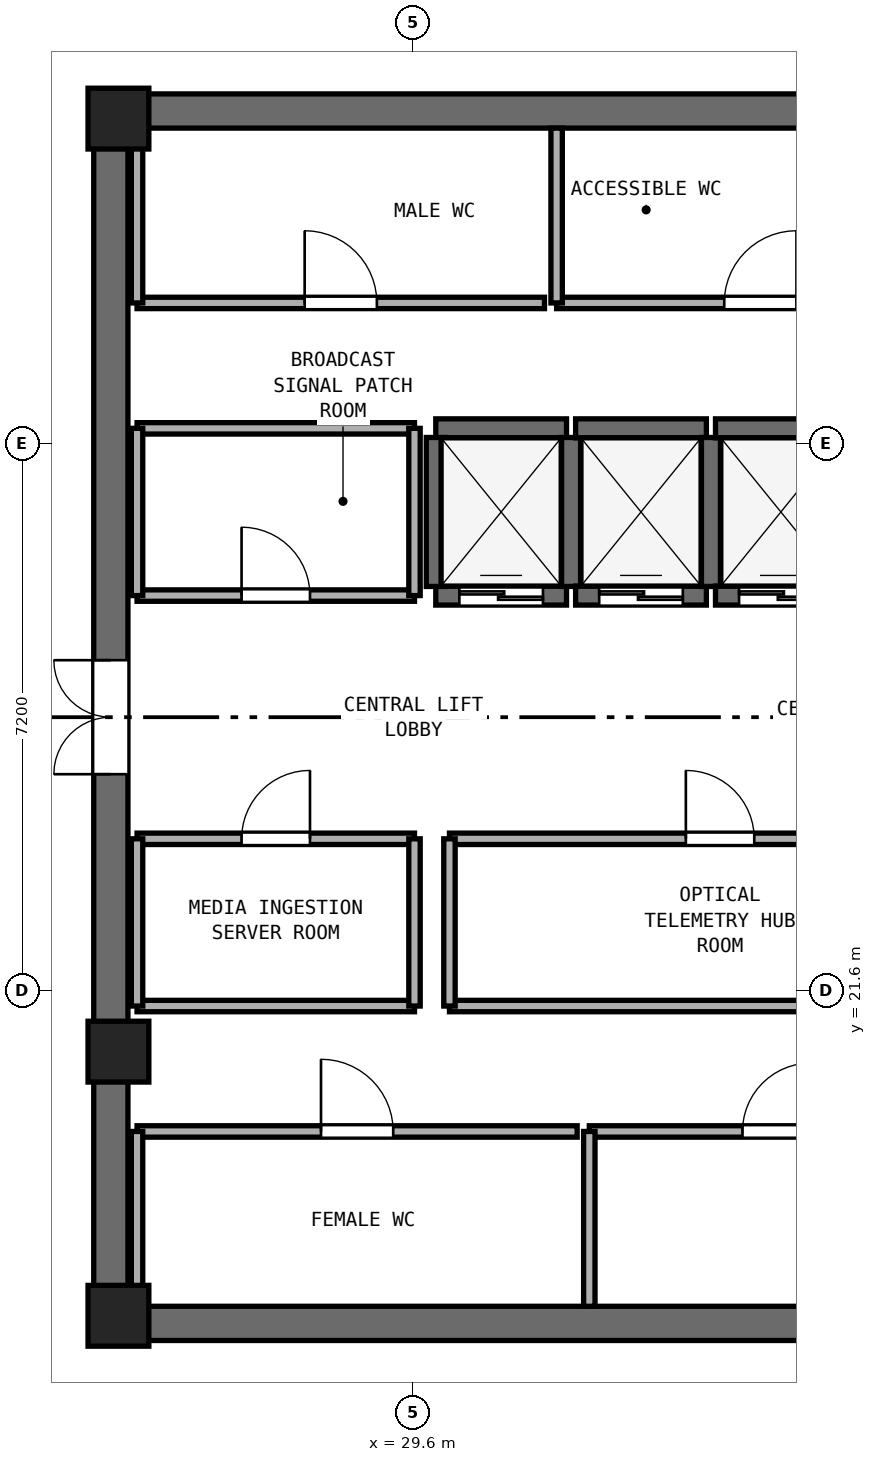
"""IFC4 building model, lengths in metres.
Left out: names, types, materials, properties, quantities, classifications, styles, units other than length and angle.
Written with IfcOpenShell. Run it as: python <this file> out.ifc"""

import sys

from ifc_helpers import new_model, si_unit, direction, frame, frame_2d, origin, origin_2d, place, context, subcontext, project, spatial, rectangle, extrude, element, fill, save


model = new_model("IFC4")
c1 = context("Model", 3, precision=1e-05, world=origin(), true_north=direction((0.0, 1.0)))
c2 = subcontext(c1, "Body", "Model", "MODEL_VIEW")
j1 = project(units=[si_unit("LENGTHUNIT", "METRE"), si_unit("PLANEANGLEUNIT", "RADIAN")], contexts=[c1])
p1 = place(None, origin())
s1 = spatial("IfcSite", under=j1, at=p1, CompositionType="ELEMENT")
p2 = place(p1, origin())
s2 = spatial("IfcBuilding", under=s1, at=p2, CompositionType="ELEMENT")
p3 = place(p2, frame((0.0, 0.0, 259.2)))
s3 = spatial("IfcBuildingStorey", under=s2, at=p3, CompositionType="ELEMENT", Elevation=259.2)
for number, where, z_axis, x_axis in (
    (1, (25.4, 17.225, 0.0), (0.0, 0.0, 1.0), (1.0, 0.0, 0.0)),
    (2, (25.4, 33.175, 0.0), (0.0, 0.0, 1.0), (1.0, 0.0, 0.0)),
):
    element("IfcWall", number, at=place(p3, frame(where, z_axis=z_axis, x_axis=x_axis)), inside=s3, PredefinedType="SHEAR", context=c2, shape_type="SweptSolid", body=[
        extrude(rectangle(XDim=23.2, YDim=0.45, at=frame_2d((11.6, 0.0))), origin(), (0.0, 0.0, 1.0), 3.51),
    ])
p4 = place(p3, frame((25.625, 17.45, 0.0), z_axis=(0.0, 0.0, 1.0), x_axis=(0.0, 1.0, 0.0)))
e3 = element("IfcWall", 3, at=p4, inside=s3, PredefinedType="SHEAR", context=c2, shape_type="SweptSolid", body=[
    extrude(rectangle(XDim=15.5, YDim=0.45, at=frame_2d((7.75, 0.0))), origin(), (0.0, 0.0, 1.0), 3.51),
])
p5 = place(p4, frame((7.0, 0.0, 0.0)))
e4 = element("IfcOpeningElement", 4, at=p5, cuts=e3, PredefinedType="OPENING", context=c2, shape_type="SweptSolid", body=[
    extrude(rectangle(XDim=1.5, YDim=2.15, at=frame_2d((0.75, 1.075))), frame((0.0, 0.235, 0.0), z_axis=(0.0, -1.0, 0.0), x_axis=(1.0, 0.0, 0.0)), (0.0, 0.0, 1.0), 0.47),
])
for number, where, z_axis, x_axis in (
    (5, (25.725, 17.325, 0.0), (0.0, 0.0, 1.0), (1.0, 0.0, 0.0)),
    (6, (25.725, 33.075, 0.0), (0.0, 0.0, 1.0), (1.0, 0.0, 0.0)),
    (7, (25.725, 20.8, 0.0), (0.0, 0.0, 1.0), (1.0, 0.0, 0.0)),
):
    element("IfcColumn", number, at=place(p3, frame(where, z_axis=z_axis, x_axis=x_axis)), inside=s3, PredefinedType="PILASTER", context=c2, shape_type="SweptSolid", body=[
        extrude(rectangle(XDim=0.8, YDim=0.8, at=origin_2d()), origin(), (0.0, 0.0, 1.0), 3.8),
    ])
p6 = place(p3, frame((29.9, 26.8, 0.0), z_axis=(0.0, 0.0, 1.0), x_axis=(1.0, 0.0, 0.0)))
e8 = element("IfcWall", 8, at=p6, inside=s3, PredefinedType="SHEAR", context=c2, shape_type="SweptSolid", body=[
    extrude(rectangle(XDim=1.72, YDim=0.25, at=frame_2d((0.86, 0.0))), origin(), (0.0, 0.0, 1.0), 3.51),
])
p7 = place(p6, frame((0.31, 0.0, 0.0)))
e9 = element("IfcOpeningElement", 9, at=p7, cuts=e8, PredefinedType="OPENING", context=c2, shape_type="SweptSolid", body=[
    extrude(rectangle(XDim=1.1, YDim=2.15, at=frame_2d((0.55, 1.075))), frame((0.0, 0.135, 0.0), z_axis=(0.0, -1.0, 0.0), x_axis=(1.0, 0.0, 0.0)), (0.0, 0.0, 1.0), 0.27),
])
p8 = place(p3, frame((29.9, 29.0, 0.0), z_axis=(0.0, 0.0, 1.0), x_axis=(1.0, 0.0, 0.0)))
e10 = element("IfcWall", 10, at=p8, inside=s3, PredefinedType="SHEAR", context=c2, shape_type="SweptSolid", body=[
    extrude(rectangle(XDim=1.72, YDim=0.25, at=frame_2d((0.86, 0.0))), origin(), (0.0, 0.0, 1.0), 3.51),
])
for number, where, z_axis, x_axis in (
    (11, (29.9, 26.92, 0.0), (0.0, 0.0, 1.0), (0.0, 1.0, 0.0)),
    (12, (31.68, 26.92, 0.0), (0.0, 0.0, 1.0), (0.0, 1.0, 0.0)),
):
    element("IfcWall", number, at=place(p3, frame(where, z_axis=z_axis, x_axis=x_axis)), inside=s3, PredefinedType="SHEAR", context=c2, shape_type="SweptSolid", body=[
        extrude(rectangle(XDim=1.96, YDim=0.25, at=frame_2d((0.98, 0.0))), origin(), (0.0, 0.0, 1.0), 3.51),
    ])
p9 = place(p3, frame((31.74, 26.8, 0.0), z_axis=(0.0, 0.0, 1.0), x_axis=(1.0, 0.0, 0.0)))
e13 = element("IfcWall", 13, at=p9, inside=s3, PredefinedType="SHEAR", context=c2, shape_type="SweptSolid", body=[
    extrude(rectangle(XDim=1.72, YDim=0.25, at=frame_2d((0.86, 0.0))), origin(), (0.0, 0.0, 1.0), 3.51),
])
p10 = place(p9, frame((0.31, 0.0, 0.0)))
e14 = element("IfcOpeningElement", 14, at=p10, cuts=e13, PredefinedType="OPENING", context=c2, shape_type="SweptSolid", body=[
    extrude(rectangle(XDim=1.1, YDim=2.15, at=frame_2d((0.55, 1.075))), frame((0.0, 0.135, 0.0), z_axis=(0.0, -1.0, 0.0), x_axis=(1.0, 0.0, 0.0)), (0.0, 0.0, 1.0), 0.27),
])
p11 = place(p3, frame((31.74, 29.0, 0.0), z_axis=(0.0, 0.0, 1.0), x_axis=(1.0, 0.0, 0.0)))
e15 = element("IfcWall", 15, at=p11, inside=s3, PredefinedType="SHEAR", context=c2, shape_type="SweptSolid", body=[
    extrude(rectangle(XDim=1.72, YDim=0.25, at=frame_2d((0.86, 0.0))), origin(), (0.0, 0.0, 1.0), 3.51),
])
p12 = place(p3, frame((33.52, 26.92, 0.0), z_axis=(0.0, 0.0, 1.0), x_axis=(0.0, 1.0, 0.0)))
e16 = element("IfcWall", 16, at=p12, inside=s3, PredefinedType="SHEAR", context=c2, shape_type="SweptSolid", body=[
    extrude(rectangle(XDim=1.96, YDim=0.25, at=frame_2d((0.98, 0.0))), origin(), (0.0, 0.0, 1.0), 3.51),
])
p13 = place(p3, frame((33.58, 26.8, 0.0), z_axis=(0.0, 0.0, 1.0), x_axis=(1.0, 0.0, 0.0)))
e17 = element("IfcWall", 17, at=p13, inside=s3, PredefinedType="SHEAR", context=c2, shape_type="SweptSolid", body=[
    extrude(rectangle(XDim=1.72, YDim=0.25, at=frame_2d((0.86, 0.0))), origin(), (0.0, 0.0, 1.0), 3.51),
])
p14 = place(p13, frame((0.31, 0.0, 0.0)))
e18 = element("IfcOpeningElement", 18, at=p14, cuts=e17, PredefinedType="OPENING", context=c2, shape_type="SweptSolid", body=[
    extrude(rectangle(XDim=1.1, YDim=2.15, at=frame_2d((0.55, 1.075))), frame((0.0, 0.135, 0.0), z_axis=(0.0, -1.0, 0.0), x_axis=(1.0, 0.0, 0.0)), (0.0, 0.0, 1.0), 0.27),
])
p15 = place(p3, frame((33.58, 29.0, 0.0), z_axis=(0.0, 0.0, 1.0), x_axis=(1.0, 0.0, 0.0)))
e19 = element("IfcWall", 19, at=p15, inside=s3, PredefinedType="SHEAR", context=c2, shape_type="SweptSolid", body=[
    extrude(rectangle(XDim=1.72, YDim=0.25, at=frame_2d((0.86, 0.0))), origin(), (0.0, 0.0, 1.0), 3.51),
])
p16 = place(p3, frame((25.97, 30.65, 0.0), z_axis=(0.0, 0.0, 1.0), x_axis=(1.0, 0.0, 0.0)))
e20 = element("IfcWall", 20, at=p16, inside=s3, PredefinedType="PARTITIONING", context=c2, shape_type="SweptSolid", body=[
    extrude(rectangle(XDim=5.36, YDim=0.15, at=frame_2d((2.68, 0.0))), origin(), (0.0, 0.0, 1.0), 3.51),
])
p17 = place(p16, frame((2.205, 0.0, 0.0)))
e21 = element("IfcOpeningElement", 21, at=p17, cuts=e20, PredefinedType="OPENING", context=c2, shape_type="SweptSolid", body=[
    extrude(rectangle(XDim=0.95, YDim=2.1, at=frame_2d((0.475, 1.05))), frame((0.0, 0.085, 0.0), z_axis=(0.0, -1.0, 0.0), x_axis=(1.0, 0.0, 0.0)), (0.0, 0.0, 1.0), 0.17),
])
p18 = place(p3, frame((25.97, 30.65, 0.0), z_axis=(0.0, 0.0, 1.0), x_axis=(0.0, 1.0, 0.0)))
e22 = element("IfcWall", 22, at=p18, inside=s3, PredefinedType="PARTITIONING", context=c2, shape_type="SweptSolid", body=[
    extrude(rectangle(XDim=2.3, YDim=0.15, at=frame_2d((1.15, 0.0))), origin(), (0.0, 0.0, 1.0), 2.61),
])
p19 = place(p3, frame((31.49, 30.65, 0.0), z_axis=(0.0, 0.0, 1.0), x_axis=(1.0, 0.0, 0.0)))
e23 = element("IfcWall", 23, at=p19, inside=s3, PredefinedType="PARTITIONING", context=c2, shape_type="SweptSolid", body=[
    extrude(rectangle(XDim=5.36, YDim=0.15, at=frame_2d((2.68, 0.0))), origin(), (0.0, 0.0, 1.0), 3.51),
])
p20 = place(p19, frame((2.205, 0.0, 0.0)))
e24 = element("IfcOpeningElement", 24, at=p20, cuts=e23, PredefinedType="OPENING", context=c2, shape_type="SweptSolid", body=[
    extrude(rectangle(XDim=0.95, YDim=2.1, at=frame_2d((0.475, 1.05))), frame((0.0, 0.085, 0.0), z_axis=(0.0, -1.0, 0.0), x_axis=(1.0, 0.0, 0.0)), (0.0, 0.0, 1.0), 0.17),
])
p21 = place(p3, frame((31.49, 30.65, 0.0), z_axis=(0.0, 0.0, 1.0), x_axis=(0.0, 1.0, 0.0)))
e25 = element("IfcWall", 25, at=p21, inside=s3, PredefinedType="PARTITIONING", context=c2, shape_type="SweptSolid", body=[
    extrude(rectangle(XDim=2.3, YDim=0.15, at=frame_2d((1.15, 0.0))), origin(), (0.0, 0.0, 1.0), 3.51),
])
p22 = place(p3, frame((25.97, 19.75, 0.0), z_axis=(0.0, 0.0, 1.0), x_axis=(1.0, 0.0, 0.0)))
e26 = element("IfcWall", 26, at=p22, inside=s3, PredefinedType="PARTITIONING", context=c2, shape_type="SweptSolid", body=[
    extrude(rectangle(XDim=5.79, YDim=0.15, at=frame_2d((2.895, 0.0))), origin(), (0.0, 0.0, 1.0), 3.51),
])
p23 = place(p22, frame((2.42, 0.0, 0.0)))
e27 = element("IfcOpeningElement", 27, at=p23, cuts=e26, PredefinedType="OPENING", context=c2, shape_type="SweptSolid", body=[
    extrude(rectangle(XDim=0.95, YDim=2.1, at=frame_2d((0.475, 1.05))), frame((0.0, 0.085, 0.0), z_axis=(0.0, -1.0, 0.0), x_axis=(1.0, 0.0, 0.0)), (0.0, 0.0, 1.0), 0.17),
])
p24 = place(p3, frame((25.97, 17.45, 0.0), z_axis=(0.0, 0.0, 1.0), x_axis=(0.0, 1.0, 0.0)))
e28 = element("IfcWall", 28, at=p24, inside=s3, PredefinedType="PARTITIONING", context=c2, shape_type="SweptSolid", body=[
    extrude(rectangle(XDim=2.3, YDim=0.15, at=frame_2d((1.15, 0.0))), origin(), (0.0, 0.0, 1.0), 2.61),
])
p25 = place(p3, frame((31.92, 19.75, 0.0), z_axis=(0.0, 0.0, 1.0), x_axis=(1.0, 0.0, 0.0)))
e29 = element("IfcWall", 29, at=p25, inside=s3, PredefinedType="PARTITIONING", context=c2, shape_type="SweptSolid", body=[
    extrude(rectangle(XDim=4.93, YDim=0.15, at=frame_2d((2.465, 0.0))), origin(), (0.0, 0.0, 1.0), 3.51),
])
p26 = place(p25, frame((2.015, 0.0, 0.0)))
e30 = element("IfcOpeningElement", 30, at=p26, cuts=e29, PredefinedType="OPENING", context=c2, shape_type="SweptSolid", body=[
    extrude(rectangle(XDim=0.9, YDim=2.1, at=frame_2d((0.45, 1.05))), frame((0.0, 0.085, 0.0), z_axis=(0.0, -1.0, 0.0), x_axis=(1.0, 0.0, 0.0)), (0.0, 0.0, 1.0), 0.17),
])
p27 = place(p3, frame((31.92, 17.45, 0.0), z_axis=(0.0, 0.0, 1.0), x_axis=(0.0, 1.0, 0.0)))
e31 = element("IfcWall", 31, at=p27, inside=s3, PredefinedType="PARTITIONING", context=c2, shape_type="SweptSolid", body=[
    extrude(rectangle(XDim=2.3, YDim=0.15, at=frame_2d((1.15, 0.0))), origin(), (0.0, 0.0, 1.0), 3.51),
])
p28 = place(p3, frame((25.97, 26.8, 0.0), z_axis=(0.0, 0.0, 1.0), x_axis=(1.0, 0.0, 0.0)))
e32 = element("IfcWall", 32, at=p28, inside=s3, PredefinedType="PARTITIONING", context=c2, shape_type="SweptSolid", body=[
    extrude(rectangle(XDim=3.65, YDim=0.15, at=frame_2d((1.825, 0.0))), origin(), (0.0, 0.0, 1.0), 3.51),
])
p29 = place(p28, frame((1.375, 0.0, 0.0)))
e33 = element("IfcOpeningElement", 33, at=p29, cuts=e32, PredefinedType="OPENING", context=c2, shape_type="SweptSolid", body=[
    extrude(rectangle(XDim=0.9, YDim=2.1, at=frame_2d((0.45, 1.05))), frame((0.0, 0.085, 0.0), z_axis=(0.0, -1.0, 0.0), x_axis=(1.0, 0.0, 0.0)), (0.0, 0.0, 1.0), 0.17),
])
p30 = place(p3, frame((25.97, 29.0, 0.0), z_axis=(0.0, 0.0, 1.0), x_axis=(1.0, 0.0, 0.0)))
e34 = element("IfcWall", 34, at=p30, inside=s3, PredefinedType="PARTITIONING", context=c2, shape_type="SweptSolid", body=[
    extrude(rectangle(XDim=3.65, YDim=0.15, at=frame_2d((1.825, 0.0))), origin(), (0.0, 0.0, 1.0), 3.51),
])
p31 = place(p3, frame((25.97, 26.8, 0.0), z_axis=(0.0, 0.0, 1.0), x_axis=(0.0, 1.0, 0.0)))
e35 = element("IfcWall", 35, at=p31, inside=s3, PredefinedType="PARTITIONING", context=c2, shape_type="SweptSolid", body=[
    extrude(rectangle(XDim=2.2, YDim=0.15, at=frame_2d((1.1, 0.0))), origin(), (0.0, 0.0, 1.0), 2.61),
])
p32 = place(p3, frame((29.62, 26.8, 0.0), z_axis=(0.0, 0.0, 1.0), x_axis=(0.0, 1.0, 0.0)))
e36 = element("IfcWall", 36, at=p32, inside=s3, PredefinedType="PARTITIONING", context=c2, shape_type="SweptSolid", body=[
    extrude(rectangle(XDim=2.2, YDim=0.15, at=frame_2d((1.1, 0.0))), origin(), (0.0, 0.0, 1.0), 3.51),
])
p33 = place(p3, frame((25.97, 21.4, 0.0), z_axis=(0.0, 0.0, 1.0), x_axis=(1.0, 0.0, 0.0)))
e37 = element("IfcWall", 37, at=p33, inside=s3, PredefinedType="PARTITIONING", context=c2, shape_type="SweptSolid", body=[
    extrude(rectangle(XDim=3.65, YDim=0.15, at=frame_2d((1.825, 0.0))), origin(), (0.0, 0.0, 1.0), 3.51),
])
p34 = place(p3, frame((25.97, 23.6, 0.0), z_axis=(0.0, 0.0, 1.0), x_axis=(1.0, 0.0, 0.0)))
e38 = element("IfcWall", 38, at=p34, inside=s3, PredefinedType="PARTITIONING", context=c2, shape_type="SweptSolid", body=[
    extrude(rectangle(XDim=3.65, YDim=0.15, at=frame_2d((1.825, 0.0))), origin(), (0.0, 0.0, 1.0), 3.51),
])
p35 = place(p34, frame((1.375, 0.0, 0.0)))
e39 = element("IfcOpeningElement", 39, at=p35, cuts=e38, PredefinedType="OPENING", context=c2, shape_type="SweptSolid", body=[
    extrude(rectangle(XDim=0.9, YDim=2.1, at=frame_2d((0.45, 1.05))), frame((0.0, 0.085, 0.0), z_axis=(0.0, -1.0, 0.0), x_axis=(1.0, 0.0, 0.0)), (0.0, 0.0, 1.0), 0.17),
])
p36 = place(p3, frame((25.97, 21.4, 0.0), z_axis=(0.0, 0.0, 1.0), x_axis=(0.0, 1.0, 0.0)))
e40 = element("IfcWall", 40, at=p36, inside=s3, PredefinedType="PARTITIONING", context=c2, shape_type="SweptSolid", body=[
    extrude(rectangle(XDim=2.2, YDim=0.15, at=frame_2d((1.1, 0.0))), origin(), (0.0, 0.0, 1.0), 2.61),
])
p37 = place(p3, frame((29.62, 21.4, 0.0), z_axis=(0.0, 0.0, 1.0), x_axis=(0.0, 1.0, 0.0)))
e41 = element("IfcWall", 41, at=p37, inside=s3, PredefinedType="PARTITIONING", context=c2, shape_type="SweptSolid", body=[
    extrude(rectangle(XDim=2.2, YDim=0.15, at=frame_2d((1.1, 0.0))), origin(), (0.0, 0.0, 1.0), 3.51),
])
p38 = place(p3, frame((30.08, 21.4, 0.0), z_axis=(0.0, 0.0, 1.0), x_axis=(1.0, 0.0, 0.0)))
e42 = element("IfcWall", 42, at=p38, inside=s3, PredefinedType="PARTITIONING", context=c2, shape_type="SweptSolid", body=[
    extrude(rectangle(XDim=7.12, YDim=0.15, at=frame_2d((3.56, 0.0))), origin(), (0.0, 0.0, 1.0), 3.51),
])
p39 = place(p3, frame((30.08, 23.6, 0.0), z_axis=(0.0, 0.0, 1.0), x_axis=(1.0, 0.0, 0.0)))
e43 = element("IfcWall", 43, at=p39, inside=s3, PredefinedType="PARTITIONING", context=c2, shape_type="SweptSolid", body=[
    extrude(rectangle(XDim=7.12, YDim=0.15, at=frame_2d((3.56, 0.0))), origin(), (0.0, 0.0, 1.0), 3.51),
])
p40 = place(p39, frame((3.11, 0.0, 0.0)))
e44 = element("IfcOpeningElement", 44, at=p40, cuts=e43, PredefinedType="OPENING", context=c2, shape_type="SweptSolid", body=[
    extrude(rectangle(XDim=0.9, YDim=2.1, at=frame_2d((0.45, 1.05))), frame((0.0, 0.085, 0.0), z_axis=(0.0, -1.0, 0.0), x_axis=(1.0, 0.0, 0.0)), (0.0, 0.0, 1.0), 0.17),
])
p41 = place(p3, frame((30.08, 21.4, 0.0), z_axis=(0.0, 0.0, 1.0), x_axis=(0.0, 1.0, 0.0)))
e45 = element("IfcWall", 45, at=p41, inside=s3, PredefinedType="PARTITIONING", context=c2, shape_type="SweptSolid", body=[
    extrude(rectangle(XDim=2.2, YDim=0.15, at=frame_2d((1.1, 0.0))), origin(), (0.0, 0.0, 1.0), 3.51),
])
p42 = place(p7, origin())
e46 = element("IfcDoor", 46, at=p42, inside=s3, OperationType="DOUBLE_DOOR_SLIDING", PredefinedType="DOOR", context=c2, shape_type="SweptSolid", body=[
    extrude(rectangle(XDim=1.1, YDim=2.15, at=frame_2d((0.55, 1.075))), frame((0.0, 0.025, 0.0), z_axis=(0.0, -1.0, 0.0), x_axis=(1.0, 0.0, 0.0)), (0.0, 0.0, 1.0), 0.05),
])
fill(e9, e46)
p43 = place(p10, origin())
e47 = element("IfcDoor", 47, at=p43, inside=s3, OperationType="DOUBLE_DOOR_SLIDING", PredefinedType="DOOR", context=c2, shape_type="SweptSolid", body=[
    extrude(rectangle(XDim=1.1, YDim=2.15, at=frame_2d((0.55, 1.075))), frame((0.0, 0.025, 0.0), z_axis=(0.0, -1.0, 0.0), x_axis=(1.0, 0.0, 0.0)), (0.0, 0.0, 1.0), 0.05),
])
fill(e14, e47)
p44 = place(p14, origin())
e48 = element("IfcDoor", 48, at=p44, inside=s3, OperationType="DOUBLE_DOOR_SLIDING", PredefinedType="DOOR", context=c2, shape_type="SweptSolid", body=[
    extrude(rectangle(XDim=1.1, YDim=2.15, at=frame_2d((0.55, 1.075))), frame((0.0, 0.025, 0.0), z_axis=(0.0, -1.0, 0.0), x_axis=(1.0, 0.0, 0.0)), (0.0, 0.0, 1.0), 0.05),
])
fill(e18, e48)
p45 = place(p5, origin())
e49 = element("IfcDoor", 49, at=p45, inside=s3, OperationType="DOUBLE_DOOR_SINGLE_SWING", PredefinedType="DOOR", context=c2, shape_type="SweptSolid", body=[
    extrude(rectangle(XDim=1.5, YDim=2.15, at=frame_2d((0.75, 1.075))), frame((0.0, 0.025, 0.0), z_axis=(0.0, -1.0, 0.0), x_axis=(1.0, 0.0, 0.0)), (0.0, 0.0, 1.0), 0.05),
])
fill(e4, e49)
p46 = place(p17, origin())
e50 = element("IfcDoor", 50, at=p46, inside=s3, OperationType="SINGLE_SWING_LEFT", PredefinedType="DOOR", context=c2, shape_type="SweptSolid", body=[
    extrude(rectangle(XDim=0.95, YDim=2.1, at=frame_2d((0.475, 1.05))), frame((0.0, 0.025, 0.0), z_axis=(0.0, -1.0, 0.0), x_axis=(1.0, 0.0, 0.0)), (0.0, 0.0, 1.0), 0.05),
])
fill(e21, e50)
p47 = place(p20, origin())
e51 = element("IfcDoor", 51, at=p47, inside=s3, OperationType="SINGLE_SWING_RIGHT", PredefinedType="DOOR", context=c2, shape_type="SweptSolid", body=[
    extrude(rectangle(XDim=0.95, YDim=2.1, at=frame_2d((0.475, 1.05))), frame((0.0, 0.025, 0.0), z_axis=(0.0, -1.0, 0.0), x_axis=(1.0, 0.0, 0.0)), (0.0, 0.0, 1.0), 0.05),
])
fill(e24, e51)
p48 = place(p23, origin())
e52 = element("IfcDoor", 52, at=p48, inside=s3, OperationType="SINGLE_SWING_LEFT", PredefinedType="DOOR", context=c2, shape_type="SweptSolid", body=[
    extrude(rectangle(XDim=0.95, YDim=2.1, at=frame_2d((0.475, 1.05))), frame((0.0, 0.025, 0.0), z_axis=(0.0, -1.0, 0.0), x_axis=(1.0, 0.0, 0.0)), (0.0, 0.0, 1.0), 0.05),
])
fill(e27, e52)
p49 = place(p26, origin())
e53 = element("IfcDoor", 53, at=p49, inside=s3, OperationType="SINGLE_SWING_RIGHT", PredefinedType="DOOR", context=c2, shape_type="SweptSolid", body=[
    extrude(rectangle(XDim=0.9, YDim=2.1, at=frame_2d((0.45, 1.05))), frame((0.0, 0.025, 0.0), z_axis=(0.0, -1.0, 0.0), x_axis=(1.0, 0.0, 0.0)), (0.0, 0.0, 1.0), 0.05),
])
fill(e30, e53)
p50 = place(p29, origin())
e54 = element("IfcDoor", 54, at=p50, inside=s3, OperationType="SINGLE_SWING_LEFT", PredefinedType="DOOR", context=c2, shape_type="SweptSolid", body=[
    extrude(rectangle(XDim=0.9, YDim=2.1, at=frame_2d((0.45, 1.05))), frame((0.0, 0.025, 0.0), z_axis=(0.0, -1.0, 0.0), x_axis=(1.0, 0.0, 0.0)), (0.0, 0.0, 1.0), 0.05),
])
fill(e33, e54)
p51 = place(p35, origin())
e55 = element("IfcDoor", 55, at=p51, inside=s3, OperationType="SINGLE_SWING_RIGHT", PredefinedType="DOOR", context=c2, shape_type="SweptSolid", body=[
    extrude(rectangle(XDim=0.9, YDim=2.1, at=frame_2d((0.45, 1.05))), frame((0.0, 0.025, 0.0), z_axis=(0.0, -1.0, 0.0), x_axis=(1.0, 0.0, 0.0)), (0.0, 0.0, 1.0), 0.05),
])
fill(e39, e55)
p52 = place(p40, origin())
e56 = element("IfcDoor", 56, at=p52, inside=s3, OperationType="SINGLE_SWING_LEFT", PredefinedType="DOOR", context=c2, shape_type="SweptSolid", body=[
    extrude(rectangle(XDim=0.9, YDim=2.1, at=frame_2d((0.45, 1.05))), frame((0.0, 0.025, 0.0), z_axis=(0.0, -1.0, 0.0), x_axis=(1.0, 0.0, 0.0)), (0.0, 0.0, 1.0), 0.05),
])
fill(e44, e56)
save(model, sys.argv[1])
